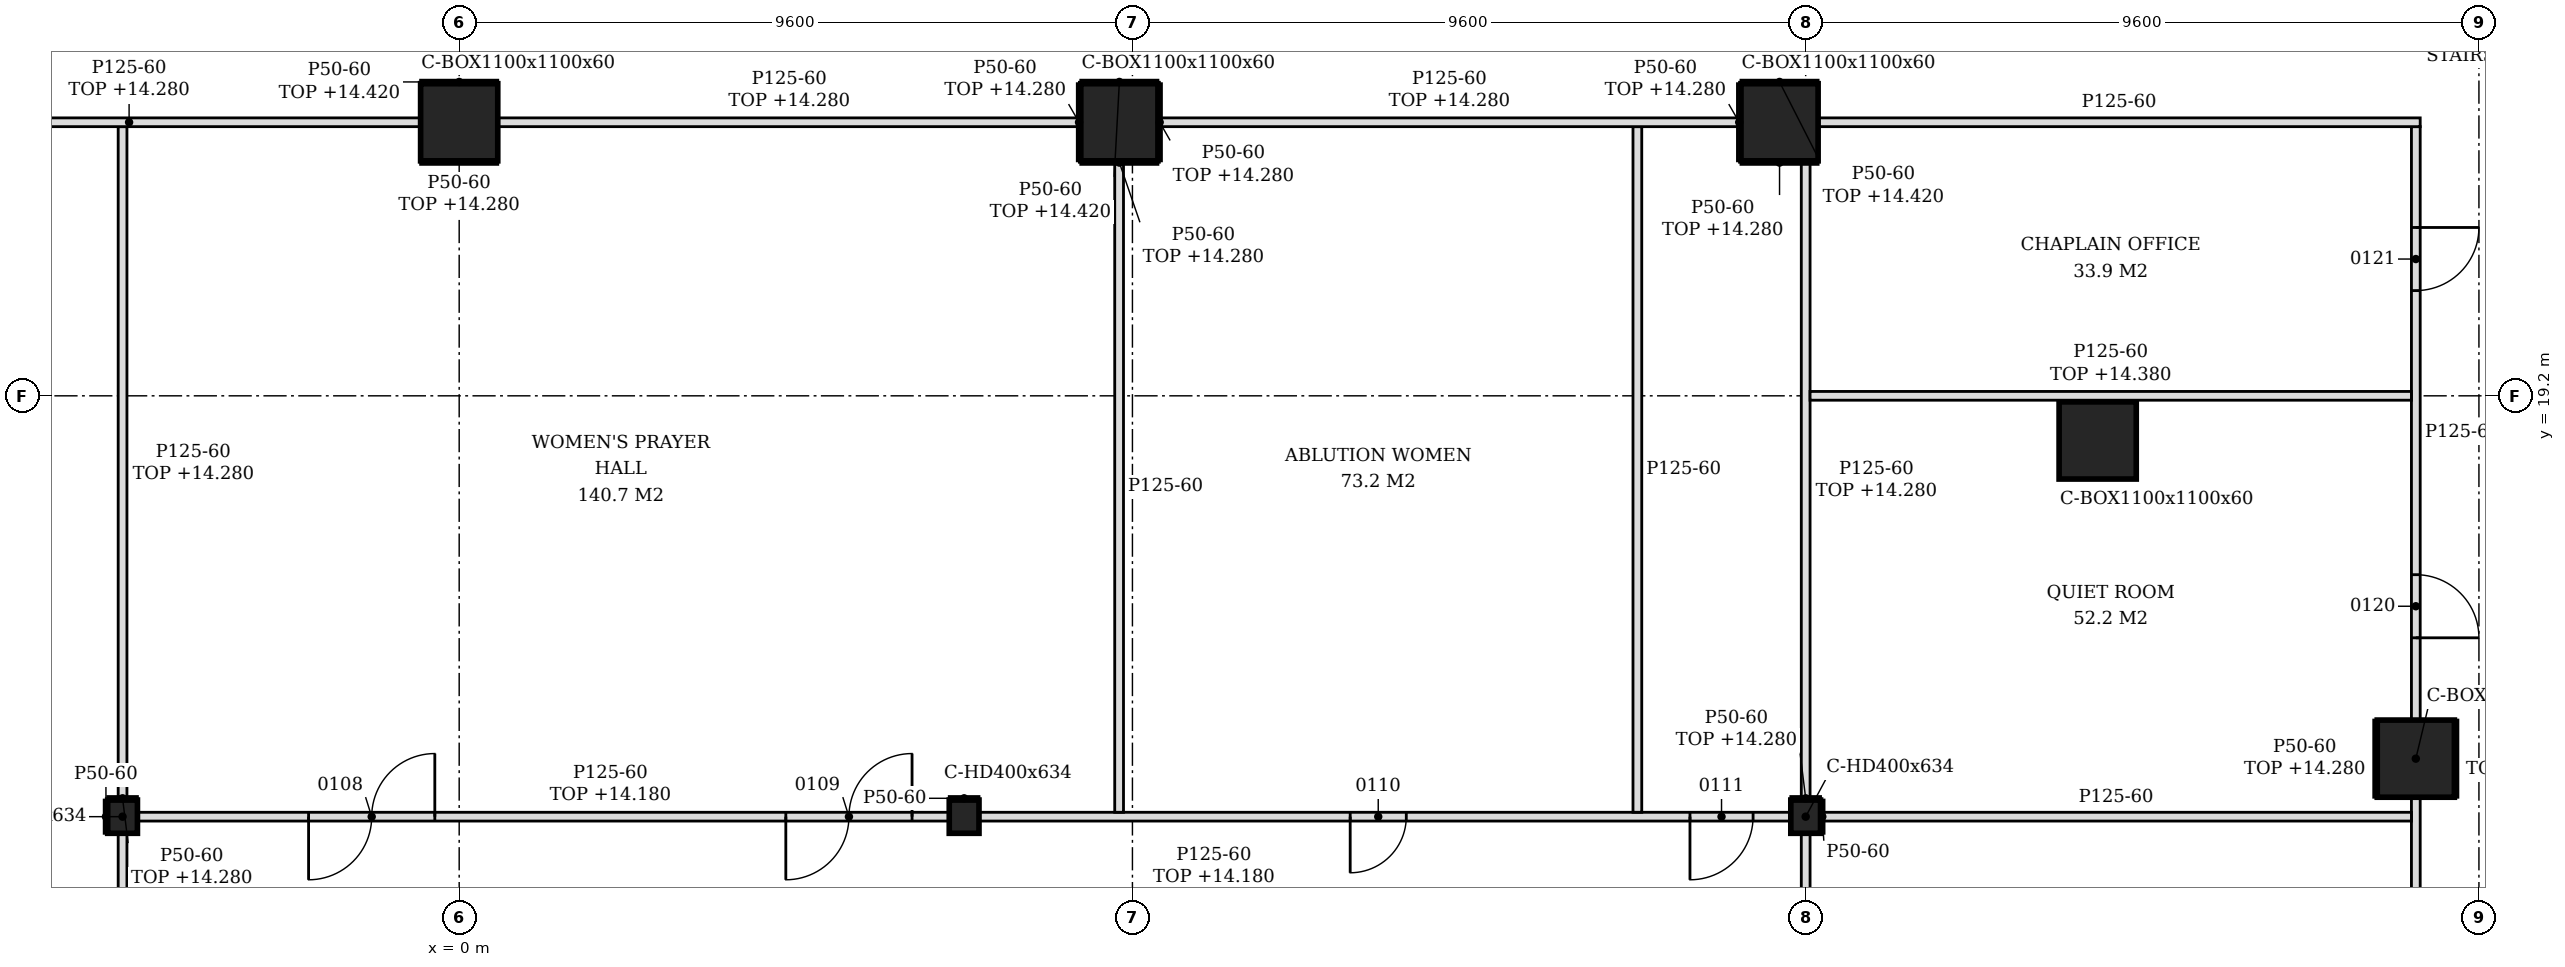
"""IFC4 building model, lengths in metres.
Left out: names, types, materials, properties, quantities, classifications, styles, units other than length and angle.
Written with IfcOpenShell. Run it as: python <this file> out.ifc"""

import sys

from ifc_helpers import new_model, si_unit, direction, frame, frame_2d, origin, origin_2d, place, context, subcontext, project, spatial, polyline, rectangle, hollow_rectangle, i_section, outline, extrude, element, fill, save


model = new_model("IFC4")
c1 = context("Model", 3, precision=1e-05, world=origin(), true_north=direction((0.0, 1.0)))
c2 = subcontext(c1, "Body", "Model", "MODEL_VIEW")
j1 = project(units=[si_unit("LENGTHUNIT", "METRE"), si_unit("PLANEANGLEUNIT", "RADIAN")], contexts=[c1])
p1 = place(None, origin())
s1 = spatial("IfcSite", under=j1, at=p1, CompositionType="ELEMENT")
p2 = place(p1, origin())
s2 = spatial("IfcBuilding", under=s1, at=p2, CompositionType="ELEMENT")
p3 = place(p2, frame((0.0, 0.0, 9.0)))
s3 = spatial("IfcBuildingStorey", under=s2, at=p3, CompositionType="ELEMENT", Elevation=9.0)
for number, where, z_axis, x_axis in (
    (1, (27.9, 14.027, -0.2), (0.0, 0.0, 1.0), (1.0, 0.0, 0.0)),
    (2, (23.364, 18.564, -0.2), (0.0, 0.0, 1.0), (1.0, 0.0, 0.0)),
    (3, (18.827, 23.1, -0.2), (0.0, 0.0, 1.0), (1.0, 0.0, 0.0)),
    (4, (9.414, 23.1, -0.2), (0.0, 0.0, 1.0), (1.0, 0.0, 0.0)),
    (5, (0.0, 23.1, -0.2), (0.0, 0.0, 1.0), (1.0, 0.0, 0.0)),
):
    element("IfcColumn", number, at=place(p3, frame(where, z_axis=z_axis, x_axis=x_axis)), inside=s3, PredefinedType="COLUMN", context=c2, shape_type="SweptSolid", body=[
        extrude(hollow_rectangle(XDim=1.1, YDim=1.1, WallThickness=0.06, at=origin_2d()), origin(), (0.0, 0.0, 1.0), 6.0),
    ])
for number, where, z_axis, x_axis in (
    (6, (-4.8, 13.2, -0.2), (0.0, 0.0, 1.0), (1.0, 0.0, 0.0)),
    (7, (7.2, 13.2, -0.2), (0.0, 0.0, 1.0), (1.0, 0.0, 0.0)),
    (8, (19.2, 13.2, -0.2), (0.0, 0.0, 1.0), (1.0, 0.0, 0.0)),
):
    element("IfcColumn", number, at=place(p3, frame(where, z_axis=z_axis, x_axis=x_axis)), inside=s3, PredefinedType="COLUMN", context=c2, shape_type="SweptSolid", body=[
        extrude(i_section(OverallWidth=0.424, OverallDepth=0.474, WebThickness=0.048, FlangeThickness=0.077, FilletRadius=0.015, at=origin_2d()), origin(), (0.0, 0.0, 1.0), 6.0),
    ])
for number, where, z_axis, x_axis in (
    (9, (-4.8, 7.863, 0.0), (0.0, 0.0, 1.0), (0.0, 1.0, 0.0)),
    (10, (19.2, 7.863, 0.0), (0.0, 0.0, 1.0), (0.0, 1.0, 0.0)),
):
    element("IfcWall", number, at=place(p3, frame(where, z_axis=z_axis, x_axis=x_axis)), inside=s3, PredefinedType="PARTITIONING", context=c2, shape_type="SweptSolid", body=[
        extrude(rectangle(XDim=5.1, YDim=0.125, at=frame_2d((2.55, 0.0))), origin(), (0.0, 0.0, 1.0), 5.18),
    ])
p4 = place(p3, frame((27.9, 7.863, 0.0), z_axis=(0.0, 0.0, 1.0), x_axis=(0.0, 1.0, 0.0)))
e11 = element("IfcWall", 11, at=p4, inside=s3, PredefinedType="PARTITIONING", context=c2, shape_type="SweptSolid", body=[
    extrude(rectangle(XDim=5.615, YDim=0.125, at=frame_2d((2.807, 0.0))), origin(), (0.0, 0.0, 1.0), 5.28),
])
p5 = place(p3, frame((-4.588, 13.2, 0.0), z_axis=(0.0, 0.0, 1.0), x_axis=(1.0, 0.0, 0.0)))
e12 = element("IfcWall", 12, at=p5, inside=s3, PredefinedType="PARTITIONING", context=c2, shape_type="SweptSolid", body=[
    extrude(rectangle(XDim=11.576, YDim=0.125, at=frame_2d((5.788, 0.0))), origin(), (0.0, 0.0, 1.0), 5.18),
])
p6 = place(p5, frame((2.44, 0.0, 0.0)))
e13 = element("IfcOpeningElement", 13, at=p6, cuts=e12, PredefinedType="OPENING", context=c2, shape_type="SweptSolid", body=[
    extrude(rectangle(XDim=1.8, YDim=2.1, at=frame_2d((0.9, 1.05))), frame((0.0, 0.073, 0.0), z_axis=(0.0, -1.0, 0.0), x_axis=(1.0, 0.0, 0.0)), (0.0, 0.0, 1.0), 0.145),
])
p7 = place(p5, frame((9.246, 0.0, 0.0)))
e14 = element("IfcOpeningElement", 14, at=p7, cuts=e12, PredefinedType="OPENING", context=c2, shape_type="SweptSolid", body=[
    extrude(rectangle(XDim=1.8, YDim=2.1, at=frame_2d((0.9, 1.05))), frame((0.0, 0.073, 0.0), z_axis=(0.0, -1.0, 0.0), x_axis=(1.0, 0.0, 0.0)), (0.0, 0.0, 1.0), 0.145),
])
p8 = place(p3, frame((7.412, 13.2, 0.0), z_axis=(0.0, 0.0, 1.0), x_axis=(1.0, 0.0, 0.0)))
e15 = element("IfcWall", 15, at=p8, inside=s3, PredefinedType="PARTITIONING", context=c2, shape_type="SweptSolid", body=[
    extrude(rectangle(XDim=11.576, YDim=0.125, at=frame_2d((5.788, 0.0))), origin(), (0.0, 0.0, 1.0), 5.18),
])
p9 = place(p8, frame((5.293, 0.0, 0.0)))
e16 = element("IfcOpeningElement", 16, at=p9, cuts=e15, PredefinedType="OPENING", context=c2, shape_type="SweptSolid", body=[
    extrude(rectangle(XDim=0.8, YDim=2.1, at=frame_2d((0.4, 1.05))), frame((0.0, 0.073, 0.0), z_axis=(0.0, -1.0, 0.0), x_axis=(1.0, 0.0, 0.0)), (0.0, 0.0, 1.0), 0.145),
])
p10 = place(p8, frame((10.138, 0.0, 0.0)))
e17 = element("IfcOpeningElement", 17, at=p10, cuts=e15, PredefinedType="OPENING", context=c2, shape_type="SweptSolid", body=[
    extrude(rectangle(XDim=0.9, YDim=2.1, at=frame_2d((0.45, 1.05))), frame((0.0, 0.073, 0.0), z_axis=(0.0, -1.0, 0.0), x_axis=(1.0, 0.0, 0.0)), (0.0, 0.0, 1.0), 0.145),
])
p11 = place(p3, frame((19.412, 13.2, 0.0), z_axis=(0.0, 0.0, 1.0), x_axis=(1.0, 0.0, 0.0)))
e18 = element("IfcWall", 18, at=p11, inside=s3, PredefinedType="PARTITIONING", context=c2, shape_type="SweptSolid", body=[
    extrude(outline(polyline([(0.0, 0.0), (8.425, 0.0), (8.426, 5.28), (8.338, 5.28), (8.336, 5.8), (4.678, 5.8), (4.676, 5.38), (4.498, 5.38), (4.496, 5.8), (0.0, 5.8), (0.0, 0.0)])), frame((0.0, 0.062, 0.0), z_axis=(0.0, -1.0, 0.0), x_axis=(1.0, 0.0, 0.0)), (0.0, 0.0, 1.0), 0.125),
])
p12 = place(p3, frame((9.41, 13.262, 0.0), z_axis=(0.0, 0.0, 1.0), x_axis=(0.0, 1.0, 0.0)))
e19 = element("IfcWall", 19, at=p12, inside=s3, PredefinedType="PARTITIONING", context=c2, shape_type="SweptSolid", body=[
    extrude(outline(polyline([(0.0, 0.0), (9.288, 0.0), (9.288, 5.8), (0.087, 5.8), (0.085, 5.18), (0.0, 5.18), (0.0, 0.0)])), frame((0.0, 0.062, 0.0), z_axis=(0.0, -1.0, 0.0), x_axis=(1.0, 0.0, 0.0)), (0.0, 0.0, 1.0), 0.125),
])
p13 = place(p3, frame((16.8, 13.262, 0.0), z_axis=(0.0, 0.0, 1.0), x_axis=(0.0, 1.0, 0.0)))
e20 = element("IfcWall", 20, at=p13, inside=s3, PredefinedType="PARTITIONING", context=c2, shape_type="SweptSolid", body=[
    extrude(outline(polyline([(0.0, 0.0), (9.775, 0.0), (9.775, 5.28), (9.688, 5.28), (9.686, 5.8), (0.087, 5.8), (0.085, 5.18), (0.0, 5.18), (0.0, 0.0)])), frame((0.0, 0.062, 0.0), z_axis=(0.0, -1.0, 0.0), x_axis=(1.0, 0.0, 0.0)), (0.0, 0.0, 1.0), 0.125),
])
p14 = place(p3, frame((-4.8, 13.437, 0.0), z_axis=(0.0, 0.0, 1.0), x_axis=(0.0, 1.0, 0.0)))
e21 = element("IfcWall", 21, at=p14, inside=s3, PredefinedType="PARTITIONING", context=c2, shape_type="SweptSolid", body=[
    extrude(rectangle(XDim=9.601, YDim=0.125, at=frame_2d((4.8, 0.0))), origin(), (0.0, 0.0, 1.0), 5.28),
])
p15 = place(p3, frame((19.2, 13.437, 0.0), z_axis=(0.0, 0.0, 1.0), x_axis=(0.0, 1.0, 0.0)))
e22 = element("IfcWall", 22, at=p15, inside=s3, PredefinedType="PARTITIONING", context=c2, shape_type="SweptSolid", body=[
    extrude(rectangle(XDim=9.113, YDim=0.125, at=frame_2d((4.557, 0.0))), origin(), (0.0, 0.0, 1.0), 5.28),
])
p16 = place(p3, frame((27.9, 14.577, 0.0), z_axis=(0.0, 0.0, 1.0), x_axis=(0.0, 1.0, 0.0)))
e23 = element("IfcWall", 23, at=p16, inside=s3, PredefinedType="PARTITIONING", context=c2, shape_type="SweptSolid", body=[
    extrude(outline(polyline([(0.0, 0.0), (8.46, 0.0), (8.46, 5.8), (4.713, 5.8), (4.711, 5.38), (4.533, 5.38), (4.531, 5.8), (0.0, 5.8), (0.0, 0.0)])), frame((0.0, 0.062, 0.0), z_axis=(0.0, -1.0, 0.0), x_axis=(1.0, 0.0, 0.0)), (0.0, 0.0, 1.0), 0.125),
])
p17 = place(p16, frame((1.173, 0.0, 0.0)))
e24 = element("IfcOpeningElement", 24, at=p17, cuts=e23, PredefinedType="OPENING", context=c2, shape_type="SweptSolid", body=[
    extrude(rectangle(XDim=0.9, YDim=2.1, at=frame_2d((0.45, 1.05))), frame((0.0, 0.073, 0.0), z_axis=(0.0, -1.0, 0.0), x_axis=(1.0, 0.0, 0.0)), (0.0, 0.0, 1.0), 0.145),
])
p18 = place(p16, frame((6.123, 0.0, 0.0)))
e25 = element("IfcOpeningElement", 25, at=p18, cuts=e23, PredefinedType="OPENING", context=c2, shape_type="SweptSolid", body=[
    extrude(rectangle(XDim=0.9, YDim=2.1, at=frame_2d((0.45, 1.05))), frame((0.0, 0.073, 0.0), z_axis=(0.0, -1.0, 0.0), x_axis=(1.0, 0.0, 0.0)), (0.0, 0.0, 1.0), 0.145),
])
p19 = place(p3, frame((19.262, 19.2, 0.0), z_axis=(0.0, 0.0, 1.0), x_axis=(1.0, 0.0, 0.0)))
e26 = element("IfcWall", 26, at=p19, inside=s3, PredefinedType="PARTITIONING", context=c2, shape_type="SweptSolid", body=[
    extrude(outline(polyline([(0.0, 0.0), (8.575, 0.0), (8.575, 5.38), (3.739, 5.38), (3.737, 5.28), (3.19, 5.28), (3.188, 5.38), (0.038, 5.38), (0.035, 5.28), (0.0, 5.28), (0.0, 0.0)])), frame((0.0, 0.062, 0.0), z_axis=(0.0, -1.0, 0.0), x_axis=(1.0, 0.0, 0.0)), (0.0, 0.0, 1.0), 0.125),
])
for number, where, z_axis, x_axis in (
    (27, (-8.864, 23.1, 0.0), (0.0, 0.0, 1.0), (1.0, 0.0, 0.0)),
    (28, (0.55, 23.1, 0.0), (0.0, 0.0, 1.0), (1.0, 0.0, 0.0)),
    (29, (9.964, 23.1, 0.0), (0.0, 0.0, 1.0), (1.0, 0.0, 0.0)),
):
    element("IfcWall", number, at=place(p3, frame(where, z_axis=z_axis, x_axis=x_axis)), inside=s3, PredefinedType="PARTITIONING", context=c2, shape_type="SweptSolid", body=[
        extrude(rectangle(XDim=8.313, YDim=0.125, at=frame_2d((4.157, 0.0))), origin(), (0.0, 0.0, 1.0), 5.28),
    ])
p20 = place(p3, frame((19.377, 23.1, 0.0), z_axis=(0.0, 0.0, 1.0), x_axis=(1.0, 0.0, 0.0)))
e30 = element("IfcWall", 30, at=p20, inside=s3, PredefinedType="PARTITIONING", context=c2, shape_type="SweptSolid", body=[
    extrude(rectangle(XDim=8.585, YDim=0.125, at=frame_2d((4.292, 0.0))), origin(), (0.0, 0.0, 1.0), 5.8),
])
for number, where, z_axis, x_axis in (
    (31, (-5.037, 12.963, 0.0), (0.0, 0.0, 1.0), (0.0, 1.0, 0.0)),
    (32, (19.437, 12.963, 0.0), (0.0, 0.0, 1.0), (0.0, 1.0, 0.0)),
):
    element("IfcWall", number, at=place(p3, frame(where, z_axis=z_axis, x_axis=x_axis)), inside=s3, PredefinedType="PARTITIONING", context=c2, shape_type="SweptSolid", body=[
        extrude(rectangle(XDim=0.474, YDim=0.05, at=frame_2d((0.237, 0.0))), origin(), (0.0, 0.0, 1.0), 5.8),
    ])
for number, where, z_axis, x_axis in (
    (33, (27.325, 13.477, 0.0), (0.0, 0.0, 1.0), (0.0, 1.0, 0.0)),
    (34, (28.475, 13.477, 0.0), (0.0, 0.0, 1.0), (0.0, 1.0, 0.0)),
):
    element("IfcWall", number, at=place(p3, frame(where, z_axis=z_axis, x_axis=x_axis)), inside=s3, PredefinedType="PARTITIONING", context=c2, shape_type="SweptSolid", body=[
        extrude(rectangle(XDim=1.1, YDim=0.05, at=frame_2d((0.55, 0.0))), origin(), (0.0, 0.0, 1.0), 5.28),
    ])
p21 = place(p3, frame((-5.012, 13.462, 0.0), z_axis=(0.0, 0.0, 1.0), x_axis=(1.0, 0.0, 0.0)))
e35 = element("IfcWall", 35, at=p21, inside=s3, PredefinedType="PARTITIONING", context=c2, shape_type="SweptSolid", body=[
    extrude(rectangle(XDim=0.424, YDim=0.05, at=frame_2d((0.212, 0.0))), origin(), (0.0, 0.0, 1.0), 5.28),
])
p22 = place(p3, frame((6.988, 13.462, 0.0), z_axis=(0.0, 0.0, 1.0), x_axis=(1.0, 0.0, 0.0)))
e36 = element("IfcWall", 36, at=p22, inside=s3, PredefinedType="PARTITIONING", context=c2, shape_type="SweptSolid", body=[
    extrude(rectangle(XDim=0.424, YDim=0.05, at=frame_2d((0.212, 0.0))), origin(), (0.0, 0.0, 1.0), 5.8),
])
p23 = place(p3, frame((18.988, 13.462, 0.0), z_axis=(0.0, 0.0, 1.0), x_axis=(1.0, 0.0, 0.0)))
e37 = element("IfcWall", 37, at=p23, inside=s3, PredefinedType="PARTITIONING", context=c2, shape_type="SweptSolid", body=[
    extrude(rectangle(XDim=0.424, YDim=0.05, at=frame_2d((0.212, 0.0))), origin(), (0.0, 0.0, 1.0), 5.28),
])
for number, where, z_axis, x_axis in (
    (38, (9.989, 22.55, 0.0), (0.0, 0.0, 1.0), (0.0, 1.0, 0.0)),
    (39, (8.839, 22.55, 0.0), (0.0, 0.0, 1.0), (0.0, 1.0, 0.0)),
    (40, (18.252, 22.55, 0.0), (0.0, 0.0, 1.0), (0.0, 1.0, 0.0)),
):
    element("IfcWall", number, at=place(p3, frame(where, z_axis=z_axis, x_axis=x_axis)), inside=s3, PredefinedType="PARTITIONING", context=c2, shape_type="SweptSolid", body=[
        extrude(rectangle(XDim=1.1, YDim=0.05, at=frame_2d((0.55, 0.0))), origin(), (0.0, 0.0, 1.0), 5.28),
    ])
p24 = place(p3, frame((-0.55, 22.525, 0.0), z_axis=(0.0, 0.0, 1.0), x_axis=(1.0, 0.0, 0.0)))
e41 = element("IfcWall", 41, at=p24, inside=s3, PredefinedType="PARTITIONING", context=c2, shape_type="SweptSolid", body=[
    extrude(rectangle(XDim=1.1, YDim=0.05, at=frame_2d((0.55, 0.0))), origin(), (0.0, 0.0, 1.0), 5.28),
])
for number, where, z_axis, x_axis in (
    (42, (-0.55, 23.675, 0.0), (0.0, 0.0, 1.0), (1.0, 0.0, 0.0)),
    (43, (8.864, 23.675, 0.0), (0.0, 0.0, 1.0), (1.0, 0.0, 0.0)),
):
    element("IfcWall", number, at=place(p3, frame(where, z_axis=z_axis, x_axis=x_axis)), inside=s3, PredefinedType="PARTITIONING", context=c2, shape_type="SweptSolid", body=[
        extrude(rectangle(XDim=1.1, YDim=0.05, at=frame_2d((0.55, 0.0))), origin(), (0.0, 0.0, 1.0), 5.42),
    ])
for number, where, z_axis, x_axis in (
    (44, (8.864, 22.525, 0.0), (0.0, 0.0, 1.0), (1.0, 0.0, 0.0)),
    (45, (18.277, 22.525, 0.0), (0.0, 0.0, 1.0), (1.0, 0.0, 0.0)),
):
    element("IfcWall", number, at=place(p3, frame(where, z_axis=z_axis, x_axis=x_axis)), inside=s3, PredefinedType="PARTITIONING", context=c2, shape_type="SweptSolid", body=[
        extrude(rectangle(XDim=1.1, YDim=0.05, at=frame_2d((0.55, 0.0))), origin(), (0.0, 0.0, 1.0), 5.28),
    ])
p25 = place(p3, frame((18.277, 23.675, 0.0), z_axis=(0.0, 0.0, 1.0), x_axis=(1.0, 0.0, 0.0)))
e46 = element("IfcWall", 46, at=p25, inside=s3, PredefinedType="PARTITIONING", context=c2, shape_type="SweptSolid", body=[
    extrude(rectangle(XDim=1.1, YDim=0.05, at=frame_2d((0.55, 0.0))), origin(), (0.0, 0.0, 1.0), 5.42),
])
p26 = place(p6, frame((1.8, 0.0, 0.0), z_axis=(0.0, 0.0, 1.0), x_axis=(-1.0, 0.0, 0.0)))
e47 = element("IfcDoor", 47, at=p26, inside=s3, OperationType="DOUBLE_DOOR_SINGLE_SWING", PredefinedType="DOOR", context=c2, shape_type="SweptSolid", body=[
    extrude(rectangle(XDim=1.8, YDim=2.1, at=frame_2d((0.9, 1.05))), frame((0.0, 0.025, 0.0), z_axis=(0.0, -1.0, 0.0), x_axis=(1.0, 0.0, 0.0)), (0.0, 0.0, 1.0), 0.05),
])
fill(e13, e47)
p27 = place(p7, frame((1.8, 0.0, 0.0), z_axis=(0.0, 0.0, 1.0), x_axis=(-1.0, 0.0, 0.0)))
e48 = element("IfcDoor", 48, at=p27, inside=s3, OperationType="DOUBLE_DOOR_SINGLE_SWING", PredefinedType="DOOR", context=c2, shape_type="SweptSolid", body=[
    extrude(rectangle(XDim=1.8, YDim=2.1, at=frame_2d((0.9, 1.05))), frame((0.0, 0.025, 0.0), z_axis=(0.0, -1.0, 0.0), x_axis=(1.0, 0.0, 0.0)), (0.0, 0.0, 1.0), 0.05),
])
fill(e14, e48)
p28 = place(p9, frame((0.8, 0.0, 0.0), z_axis=(0.0, 0.0, 1.0), x_axis=(-1.0, 0.0, 0.0)))
e49 = element("IfcDoor", 49, at=p28, inside=s3, OperationType="SINGLE_SWING_RIGHT", PredefinedType="DOOR", context=c2, shape_type="SweptSolid", body=[
    extrude(rectangle(XDim=0.8, YDim=2.1, at=frame_2d((0.4, 1.05))), frame((0.0, 0.025, 0.0), z_axis=(0.0, -1.0, 0.0), x_axis=(1.0, 0.0, 0.0)), (0.0, 0.0, 1.0), 0.05),
])
fill(e16, e49)
p29 = place(p10, frame((0.9, 0.0, 0.0), z_axis=(0.0, 0.0, 1.0), x_axis=(-1.0, 0.0, 0.0)))
e50 = element("IfcDoor", 50, at=p29, inside=s3, OperationType="SINGLE_SWING_RIGHT", PredefinedType="DOOR", context=c2, shape_type="SweptSolid", body=[
    extrude(rectangle(XDim=0.9, YDim=2.1, at=frame_2d((0.45, 1.05))), frame((0.0, 0.025, 0.0), z_axis=(0.0, -1.0, 0.0), x_axis=(1.0, 0.0, 0.0)), (0.0, 0.0, 1.0), 0.05),
])
fill(e17, e50)
p30 = place(p17, frame((0.9, 0.0, 0.0), z_axis=(0.0, 0.0, 1.0), x_axis=(-1.0, 0.0, 0.0)))
e51 = element("IfcDoor", 51, at=p30, inside=s3, OperationType="SINGLE_SWING_RIGHT", PredefinedType="DOOR", context=c2, shape_type="SweptSolid", body=[
    extrude(rectangle(XDim=0.9, YDim=2.1, at=frame_2d((0.45, 1.05))), frame((0.0, 0.025, 0.0), z_axis=(0.0, -1.0, 0.0), x_axis=(1.0, 0.0, 0.0)), (0.0, 0.0, 1.0), 0.05),
])
fill(e24, e51)
p31 = place(p18, frame((0.9, 0.0, 0.0), z_axis=(0.0, 0.0, 1.0), x_axis=(-1.0, 0.0, 0.0)))
e52 = element("IfcDoor", 52, at=p31, inside=s3, OperationType="SINGLE_SWING_LEFT", PredefinedType="DOOR", context=c2, shape_type="SweptSolid", body=[
    extrude(rectangle(XDim=0.9, YDim=2.1, at=frame_2d((0.45, 1.05))), frame((0.0, 0.025, 0.0), z_axis=(0.0, -1.0, 0.0), x_axis=(1.0, 0.0, 0.0)), (0.0, 0.0, 1.0), 0.05),
])
fill(e25, e52)
save(model, sys.argv[1])
